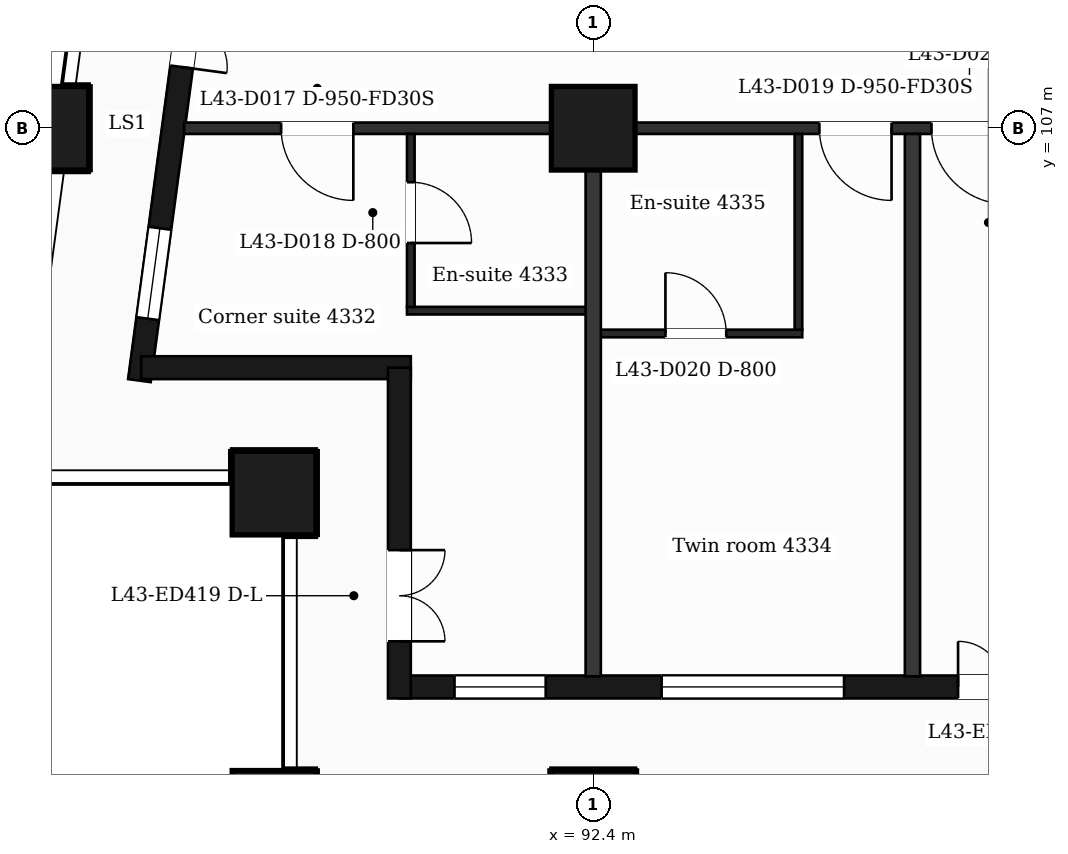
"""IFC4 building model, lengths in metres.
Left out: names, types, materials, properties, quantities, classifications, styles, units other than length and angle.
Written with IfcOpenShell. Run it as: python <this file> out.ifc"""

import sys

from ifc_helpers import new_model, si_unit, direction, frame, frame_2d, origin, origin_2d, place, context, subcontext, project, spatial, rectangle, extrude, element, fill, save


model = new_model("IFC4")
c1 = context("Model", 3, precision=1e-05, world=origin(), true_north=direction((0.0, 1.0)))
c2 = subcontext(c1, "Body", "Model", "MODEL_VIEW")
j1 = project(units=[si_unit("LENGTHUNIT", "METRE"), si_unit("PLANEANGLEUNIT", "RADIAN")], contexts=[c1])
p1 = place(None, origin())
s1 = spatial("IfcSite", under=j1, at=p1, CompositionType="ELEMENT")
p2 = place(p1, origin())
s2 = spatial("IfcBuilding", under=s1, at=p2, CompositionType="ELEMENT")
p3 = place(p2, frame((0.0, 0.0, 181.1)))
s3 = spatial("IfcBuildingStorey", under=s2, at=p3, CompositionType="ELEMENT", Elevation=181.1)
for number, where, z_axis, x_axis in (
    (1, (92.4, 98.0, 0.0), (0.0, 0.0, 1.0), (1.0, 0.0, 0.0)),
    (2, (88.2, 98.0, 0.0), (0.0, 0.0, 1.0), (1.0, 0.0, 0.0)),
    (3, (88.2, 102.2, 0.0), (0.0, 0.0, 1.0), (1.0, 0.0, 0.0)),
    (4, (92.4, 107.0, 0.0), (0.0, 0.0, 1.0), (1.0, 0.0, 0.0)),
    (5, (85.211, 107.0, 0.0), (0.0, 0.0, 1.0), (1.0, 0.0, 0.0)),
):
    element("IfcColumn", number, at=place(p3, frame(where, z_axis=z_axis, x_axis=x_axis)), inside=s3, PredefinedType="COLUMN", context=c2, shape_type="SweptSolid", body=[
        extrude(rectangle(XDim=1.1, YDim=1.1, at=origin_2d()), origin(), (0.0, 0.0, 1.0), 3.7),
    ])
p4 = place(p3, frame((89.85, 99.65, 0.0), z_axis=(0.0, 0.0, 1.0), x_axis=(1.0, 0.0, 0.0)))
e6 = element("IfcWall", 6, at=p4, inside=s3, PredefinedType="SOLIDWALL", context=c2, shape_type="SweptSolid", body=[
    extrude(rectangle(XDim=47.25, YDim=0.3, at=frame_2d((23.625, 0.0))), origin(), (0.0, 0.0, 1.0), 3.38),
])
p5 = place(p4, frame((0.725, 0.0, 0.9)))
e7 = element("IfcOpeningElement", 7, at=p5, cuts=e6, PredefinedType="OPENING", context=c2, shape_type="SweptSolid", body=[
    extrude(rectangle(XDim=1.2, YDim=2.1, at=frame_2d((0.6, 1.05))), frame((0.0, 0.16, 0.0), z_axis=(0.0, -1.0, 0.0), x_axis=(1.0, 0.0, 0.0)), (0.0, 0.0, 1.0), 0.32),
])
p6 = place(p4, frame((3.45, 0.0, 0.9)))
e8 = element("IfcOpeningElement", 8, at=p6, cuts=e6, PredefinedType="OPENING", context=c2, shape_type="SweptSolid", body=[
    extrude(rectangle(XDim=2.4, YDim=2.1, at=frame_2d((1.2, 1.05))), frame((0.0, 0.16, 0.0), z_axis=(0.0, -1.0, 0.0), x_axis=(1.0, 0.0, 0.0)), (0.0, 0.0, 1.0), 0.32),
])
p7 = place(p4, frame((7.35, 0.0, 0.0)))
e9 = element("IfcOpeningElement", 9, at=p7, cuts=e6, PredefinedType="OPENING", context=c2, shape_type="SweptSolid", body=[
    extrude(rectangle(XDim=1.2, YDim=2.4, at=frame_2d((0.6, 1.2))), frame((0.0, 0.16, 0.0), z_axis=(0.0, -1.0, 0.0), x_axis=(1.0, 0.0, 0.0)), (0.0, 0.0, 1.0), 0.32),
])
p8 = place(p4, frame((9.15, 0.0, 0.9)))
e10 = element("IfcOpeningElement", 10, at=p8, cuts=e6, PredefinedType="OPENING", context=c2, shape_type="SweptSolid", body=[
    extrude(rectangle(XDim=1.2, YDim=2.1, at=frame_2d((0.6, 1.05))), frame((0.0, 0.16, 0.0), z_axis=(0.0, -1.0, 0.0), x_axis=(1.0, 0.0, 0.0)), (0.0, 0.0, 1.0), 0.32),
])
p9 = place(p4, frame((11.85, 0.0, 0.9)))
e11 = element("IfcOpeningElement", 11, at=p9, cuts=e6, PredefinedType="OPENING", context=c2, shape_type="SweptSolid", body=[
    extrude(rectangle(XDim=2.4, YDim=2.1, at=frame_2d((1.2, 1.05))), frame((0.0, 0.16, 0.0), z_axis=(0.0, -1.0, 0.0), x_axis=(1.0, 0.0, 0.0)), (0.0, 0.0, 1.0), 0.32),
])
p10 = place(p4, frame((16.05, 0.0, 0.9)))
e12 = element("IfcOpeningElement", 12, at=p10, cuts=e6, PredefinedType="OPENING", context=c2, shape_type="SweptSolid", body=[
    extrude(rectangle(XDim=2.4, YDim=2.1, at=frame_2d((1.2, 1.05))), frame((0.0, 0.16, 0.0), z_axis=(0.0, -1.0, 0.0), x_axis=(1.0, 0.0, 0.0)), (0.0, 0.0, 1.0), 0.32),
])
p11 = place(p4, frame((20.85, 0.0, 0.9)))
e13 = element("IfcOpeningElement", 13, at=p11, cuts=e6, PredefinedType="OPENING", context=c2, shape_type="SweptSolid", body=[
    extrude(rectangle(XDim=1.2, YDim=2.1, at=frame_2d((0.6, 1.05))), frame((0.0, 0.16, 0.0), z_axis=(0.0, -1.0, 0.0), x_axis=(1.0, 0.0, 0.0)), (0.0, 0.0, 1.0), 0.32),
])
p12 = place(p4, frame((25.05, 0.0, 0.9)))
e14 = element("IfcOpeningElement", 14, at=p12, cuts=e6, PredefinedType="OPENING", context=c2, shape_type="SweptSolid", body=[
    extrude(rectangle(XDim=1.2, YDim=2.1, at=frame_2d((0.6, 1.05))), frame((0.0, 0.16, 0.0), z_axis=(0.0, -1.0, 0.0), x_axis=(1.0, 0.0, 0.0)), (0.0, 0.0, 1.0), 0.32),
])
p13 = place(p4, frame((28.65, 0.0, 0.9)))
e15 = element("IfcOpeningElement", 15, at=p13, cuts=e6, PredefinedType="OPENING", context=c2, shape_type="SweptSolid", body=[
    extrude(rectangle(XDim=2.4, YDim=2.1, at=frame_2d((1.2, 1.05))), frame((0.0, 0.16, 0.0), z_axis=(0.0, -1.0, 0.0), x_axis=(1.0, 0.0, 0.0)), (0.0, 0.0, 1.0), 0.32),
])
p14 = place(p4, frame((32.85, 0.0, 0.9)))
e16 = element("IfcOpeningElement", 16, at=p14, cuts=e6, PredefinedType="OPENING", context=c2, shape_type="SweptSolid", body=[
    extrude(rectangle(XDim=2.4, YDim=2.1, at=frame_2d((1.2, 1.05))), frame((0.0, 0.16, 0.0), z_axis=(0.0, -1.0, 0.0), x_axis=(1.0, 0.0, 0.0)), (0.0, 0.0, 1.0), 0.32),
])
p15 = place(p4, frame((37.05, 0.0, 0.9)))
e17 = element("IfcOpeningElement", 17, at=p15, cuts=e6, PredefinedType="OPENING", context=c2, shape_type="SweptSolid", body=[
    extrude(rectangle(XDim=2.4, YDim=2.1, at=frame_2d((1.2, 1.05))), frame((0.0, 0.16, 0.0), z_axis=(0.0, -1.0, 0.0), x_axis=(1.0, 0.0, 0.0)), (0.0, 0.0, 1.0), 0.32),
])
p16 = place(p4, frame((41.25, 0.0, 0.9)))
e18 = element("IfcOpeningElement", 18, at=p16, cuts=e6, PredefinedType="OPENING", context=c2, shape_type="SweptSolid", body=[
    extrude(rectangle(XDim=2.4, YDim=2.1, at=frame_2d((1.2, 1.05))), frame((0.0, 0.16, 0.0), z_axis=(0.0, -1.0, 0.0), x_axis=(1.0, 0.0, 0.0)), (0.0, 0.0, 1.0), 0.32),
])
p17 = place(p4, frame((45.25, 0.0, 0.9)))
e19 = element("IfcOpeningElement", 19, at=p17, cuts=e6, PredefinedType="OPENING", context=c2, shape_type="SweptSolid", body=[
    extrude(rectangle(XDim=1.2, YDim=2.1, at=frame_2d((0.6, 1.05))), frame((0.0, 0.16, 0.0), z_axis=(0.0, -1.0, 0.0), x_axis=(1.0, 0.0, 0.0)), (0.0, 0.0, 1.0), 0.32),
])
p18 = place(p3, frame((87.334, 110.4, 0.0), z_axis=(0.0, 0.0, 1.0), x_axis=(-0.133437175554, -0.991057273915, 0.0)))
e20 = element("IfcWall", 20, at=p18, inside=s3, PredefinedType="SOLIDWALL", context=c2, shape_type="SweptSolid", body=[
    extrude(rectangle(XDim=6.781, YDim=0.3, at=frame_2d((3.39, 0.0))), origin(), (0.0, 0.0, 1.0), 3.38),
])
p19 = place(p18, frame((1.418, 0.0, 0.0)))
e21 = element("IfcOpeningElement", 21, at=p19, cuts=e20, PredefinedType="OPENING", context=c2, shape_type="SweptSolid", body=[
    extrude(rectangle(XDim=1.2, YDim=2.4, at=frame_2d((0.6, 1.2))), frame((0.0, 0.16, 0.0), z_axis=(0.0, -1.0, 0.0), x_axis=(1.0, 0.0, 0.0)), (0.0, 0.0, 1.0), 0.32),
])
p20 = place(p18, frame((4.758, 0.0, 0.9)))
e22 = element("IfcOpeningElement", 22, at=p20, cuts=e20, PredefinedType="OPENING", context=c2, shape_type="SweptSolid", body=[
    extrude(rectangle(XDim=1.2, YDim=2.1, at=frame_2d((0.6, 1.05))), frame((0.0, 0.16, 0.0), z_axis=(0.0, -1.0, 0.0), x_axis=(1.0, 0.0, 0.0)), (0.0, 0.0, 1.0), 0.32),
])
p21 = place(p3, frame((86.452, 103.85, 0.0), z_axis=(0.0, 0.0, 1.0), x_axis=(1.0, 0.0, 0.0)))
e23 = element("IfcWall", 23, at=p21, inside=s3, PredefinedType="SOLIDWALL", context=c2, shape_type="SweptSolid", body=[
    extrude(rectangle(XDim=3.548, YDim=0.3, at=frame_2d((1.774, 0.0))), origin(), (0.0, 0.0, 1.0), 3.38),
])
p22 = place(p3, frame((89.85, 103.85, 0.0), z_axis=(0.0, 0.0, 1.0), x_axis=(0.0, -1.0, 0.0)))
e24 = element("IfcWall", 24, at=p22, inside=s3, PredefinedType="SOLIDWALL", context=c2, shape_type="SweptSolid", body=[
    extrude(rectangle(XDim=4.35, YDim=0.3, at=frame_2d((2.175, 0.0))), origin(), (0.0, 0.0, 1.0), 3.38),
])
p23 = place(p22, frame((2.4, 0.0, 0.0)))
e25 = element("IfcOpeningElement", 25, at=p23, cuts=e24, PredefinedType="OPENING", context=c2, shape_type="SweptSolid", body=[
    extrude(rectangle(XDim=1.2, YDim=2.4, at=frame_2d((0.6, 1.2))), frame((0.0, 0.16, 0.0), z_axis=(0.0, -1.0, 0.0), x_axis=(1.0, 0.0, 0.0)), (0.0, 0.0, 1.0), 0.32),
])
p24 = place(p3, frame((92.4, 104.3, 0.0), z_axis=(0.0, 0.0, 1.0), x_axis=(1.0, 0.0, 0.0)))
e26 = element("IfcWall", 26, at=p24, inside=s3, PredefinedType="PARTITIONING", context=c2, shape_type="SweptSolid", body=[
    extrude(rectangle(XDim=2.75, YDim=0.1, at=frame_2d((1.375, 0.0))), origin(), (0.0, 0.0, 1.0), 3.38),
])
p25 = place(p24, frame((0.95, 0.0, 0.0)))
e27 = element("IfcOpeningElement", 27, at=p25, cuts=e26, PredefinedType="OPENING", context=c2, shape_type="SweptSolid", body=[
    extrude(rectangle(XDim=0.8, YDim=2.1, at=frame_2d((0.4, 1.05))), frame((0.0, 0.06, 0.0), z_axis=(0.0, -1.0, 0.0), x_axis=(1.0, 0.0, 0.0)), (0.0, 0.0, 1.0), 0.12),
])
p26 = place(p3, frame((89.95, 104.6, 0.0), z_axis=(0.0, 0.0, 1.0), x_axis=(1.0, 0.0, 0.0)))
e28 = element("IfcWall", 28, at=p26, inside=s3, PredefinedType="PARTITIONING", context=c2, shape_type="SweptSolid", body=[
    extrude(rectangle(XDim=2.45, YDim=0.1, at=frame_2d((1.225, 0.0))), origin(), (0.0, 0.0, 1.0), 3.38),
])
p27 = place(p3, frame((87.018, 107.0, 0.0), z_axis=(0.0, 0.0, 1.0), x_axis=(1.0, 0.0, 0.0)))
e29 = element("IfcWall", 29, at=p27, inside=s3, PredefinedType="PARTITIONING", context=c2, shape_type="SweptSolid", body=[
    extrude(rectangle(XDim=52.765, YDim=0.15, at=frame_2d((26.382, 0.0))), origin(), (0.0, 0.0, 1.0), 3.38),
])
p28 = place(p27, frame((1.276, 0.0, 0.0)))
e30 = element("IfcOpeningElement", 30, at=p28, cuts=e29, PredefinedType="OPENING", context=c2, shape_type="SweptSolid", body=[
    extrude(rectangle(XDim=0.95, YDim=2.1, at=frame_2d((0.475, 1.05))), frame((0.0, 0.085, 0.0), z_axis=(0.0, -1.0, 0.0), x_axis=(1.0, 0.0, 0.0)), (0.0, 0.0, 1.0), 0.17),
])
p29 = place(p27, frame((8.357, 0.0, 0.0)))
e31 = element("IfcOpeningElement", 31, at=p29, cuts=e29, PredefinedType="OPENING", context=c2, shape_type="SweptSolid", body=[
    extrude(rectangle(XDim=0.95, YDim=2.1, at=frame_2d((0.475, 1.05))), frame((0.0, 0.085, 0.0), z_axis=(0.0, -1.0, 0.0), x_axis=(1.0, 0.0, 0.0)), (0.0, 0.0, 1.0), 0.17),
])
p30 = place(p27, frame((9.832, 0.0, 0.0)))
e32 = element("IfcOpeningElement", 32, at=p30, cuts=e29, PredefinedType="OPENING", context=c2, shape_type="SweptSolid", body=[
    extrude(rectangle(XDim=1.0, YDim=2.1, at=frame_2d((0.5, 1.05))), frame((0.0, 0.085, 0.0), z_axis=(0.0, -1.0, 0.0), x_axis=(1.0, 0.0, 0.0)), (0.0, 0.0, 1.0), 0.17),
])
p31 = place(p27, frame((14.547, 0.0, 0.0)))
e33 = element("IfcOpeningElement", 33, at=p31, cuts=e29, PredefinedType="OPENING", context=c2, shape_type="SweptSolid", body=[
    extrude(rectangle(XDim=0.95, YDim=2.1, at=frame_2d((0.475, 1.05))), frame((0.0, 0.085, 0.0), z_axis=(0.0, -1.0, 0.0), x_axis=(1.0, 0.0, 0.0)), (0.0, 0.0, 1.0), 0.17),
])
p32 = place(p27, frame((18.257, 0.0, 0.0)))
e34 = element("IfcOpeningElement", 34, at=p32, cuts=e29, PredefinedType="OPENING", context=c2, shape_type="SweptSolid", body=[
    extrude(rectangle(XDim=0.95, YDim=2.1, at=frame_2d((0.475, 1.05))), frame((0.0, 0.085, 0.0), z_axis=(0.0, -1.0, 0.0), x_axis=(1.0, 0.0, 0.0)), (0.0, 0.0, 1.0), 0.17),
])
p33 = place(p27, frame((25.212, 0.0, 0.0)))
e35 = element("IfcOpeningElement", 35, at=p33, cuts=e29, PredefinedType="OPENING", context=c2, shape_type="SweptSolid", body=[
    extrude(rectangle(XDim=1.0, YDim=2.1, at=frame_2d((0.5, 1.05))), frame((0.0, 0.085, 0.0), z_axis=(0.0, -1.0, 0.0), x_axis=(1.0, 0.0, 0.0)), (0.0, 0.0, 1.0), 0.17),
])
p34 = place(p27, frame((37.267, 0.0, 0.0)))
e36 = element("IfcOpeningElement", 36, at=p34, cuts=e29, PredefinedType="OPENING", context=c2, shape_type="SweptSolid", body=[
    extrude(rectangle(XDim=0.95, YDim=2.1, at=frame_2d((0.475, 1.05))), frame((0.0, 0.085, 0.0), z_axis=(0.0, -1.0, 0.0), x_axis=(1.0, 0.0, 0.0)), (0.0, 0.0, 1.0), 0.17),
])
p35 = place(p27, frame((41.957, 0.0, 0.0)))
e37 = element("IfcOpeningElement", 37, at=p35, cuts=e29, PredefinedType="OPENING", context=c2, shape_type="SweptSolid", body=[
    extrude(rectangle(XDim=0.95, YDim=2.1, at=frame_2d((0.475, 1.05))), frame((0.0, 0.085, 0.0), z_axis=(0.0, -1.0, 0.0), x_axis=(1.0, 0.0, 0.0)), (0.0, 0.0, 1.0), 0.17),
])
p36 = place(p27, frame((45.632, 0.0, 0.0)))
e38 = element("IfcOpeningElement", 38, at=p36, cuts=e29, PredefinedType="OPENING", context=c2, shape_type="SweptSolid", body=[
    extrude(rectangle(XDim=0.95, YDim=2.1, at=frame_2d((0.475, 1.05))), frame((0.0, 0.085, 0.0), z_axis=(0.0, -1.0, 0.0), x_axis=(1.0, 0.0, 0.0)), (0.0, 0.0, 1.0), 0.17),
])
p37 = place(p27, frame((48.767, 0.0, 0.0)))
e39 = element("IfcOpeningElement", 39, at=p37, cuts=e29, PredefinedType="OPENING", context=c2, shape_type="SweptSolid", body=[
    extrude(rectangle(XDim=0.95, YDim=2.1, at=frame_2d((0.475, 1.05))), frame((0.0, 0.085, 0.0), z_axis=(0.0, -1.0, 0.0), x_axis=(1.0, 0.0, 0.0)), (0.0, 0.0, 1.0), 0.17),
])
p38 = place(p3, frame((90.0, 104.65, 0.0), z_axis=(0.0, 0.0, 1.0), x_axis=(0.0, 1.0, 0.0)))
e40 = element("IfcWall", 40, at=p38, inside=s3, PredefinedType="PARTITIONING", context=c2, shape_type="SweptSolid", body=[
    extrude(rectangle(XDim=2.275, YDim=0.1, at=frame_2d((1.138, 0.0))), origin(), (0.0, 0.0, 1.0), 3.38),
])
p39 = place(p38, frame((0.84, 0.0, 0.0)))
e41 = element("IfcOpeningElement", 41, at=p39, cuts=e40, PredefinedType="OPENING", context=c2, shape_type="SweptSolid", body=[
    extrude(rectangle(XDim=0.8, YDim=2.1, at=frame_2d((0.4, 1.05))), frame((0.0, 0.06, 0.0), z_axis=(0.0, -1.0, 0.0), x_axis=(1.0, 0.0, 0.0)), (0.0, 0.0, 1.0), 0.12),
])
p40 = place(p3, frame((92.4, 99.79, 0.0), z_axis=(0.0, 0.0, 1.0), x_axis=(0.0, 1.0, 0.0)))
e42 = element("IfcWall", 42, at=p40, inside=s3, PredefinedType="PARTITIONING", context=c2, shape_type="SweptSolid", body=[
    extrude(rectangle(XDim=7.135, YDim=0.2, at=frame_2d((3.567, 0.0))), origin(), (0.0, 0.0, 1.0), 3.38),
])
p41 = place(p3, frame((95.1, 104.35, 0.0), z_axis=(0.0, 0.0, 1.0), x_axis=(0.0, 1.0, 0.0)))
e43 = element("IfcWall", 43, at=p41, inside=s3, PredefinedType="PARTITIONING", context=c2, shape_type="SweptSolid", body=[
    extrude(rectangle(XDim=2.575, YDim=0.1, at=frame_2d((1.288, 0.0))), origin(), (0.0, 0.0, 1.0), 3.38),
])
p42 = place(p3, frame((96.6, 99.79, 0.0), z_axis=(0.0, 0.0, 1.0), x_axis=(0.0, 1.0, 0.0)))
e44 = element("IfcWall", 44, at=p42, inside=s3, PredefinedType="PARTITIONING", context=c2, shape_type="SweptSolid", body=[
    extrude(rectangle(XDim=7.135, YDim=0.2, at=frame_2d((3.567, 0.0))), origin(), (0.0, 0.0, 1.0), 3.38),
])
p43 = place(p5, origin())
e45 = element("IfcWindow", 45, at=p43, inside=s3, PartitioningType="SINGLE_PANEL", PredefinedType="WINDOW", context=c2, shape_type="SweptSolid", body=[
    extrude(rectangle(XDim=1.2, YDim=2.1, at=frame_2d((0.6, 1.05))), frame((0.0, 0.03, 0.0), z_axis=(0.0, -1.0, 0.0), x_axis=(1.0, 0.0, 0.0)), (0.0, 0.0, 1.0), 0.06),
])
fill(e7, e45)
p44 = place(p6, origin())
e46 = element("IfcWindow", 46, at=p44, inside=s3, PartitioningType="SINGLE_PANEL", PredefinedType="WINDOW", context=c2, shape_type="SweptSolid", body=[
    extrude(rectangle(XDim=2.4, YDim=2.1, at=frame_2d((1.2, 1.05))), frame((0.0, 0.03, 0.0), z_axis=(0.0, -1.0, 0.0), x_axis=(1.0, 0.0, 0.0)), (0.0, 0.0, 1.0), 0.06),
])
fill(e8, e46)
p45 = place(p7, origin())
e47 = element("IfcDoor", 47, at=p45, inside=s3, OperationType="DOUBLE_DOOR_SINGLE_SWING", PredefinedType="DOOR", context=c2, shape_type="SweptSolid", body=[
    extrude(rectangle(XDim=1.2, YDim=2.4, at=frame_2d((0.6, 1.2))), frame((0.0, 0.025, 0.0), z_axis=(0.0, -1.0, 0.0), x_axis=(1.0, 0.0, 0.0)), (0.0, 0.0, 1.0), 0.05),
])
fill(e9, e47)
p46 = place(p19, origin())
e48 = element("IfcDoor", 48, at=p46, inside=s3, OperationType="DOUBLE_DOOR_SINGLE_SWING", PredefinedType="DOOR", context=c2, shape_type="SweptSolid", body=[
    extrude(rectangle(XDim=1.2, YDim=2.4, at=frame_2d((0.6, 1.2))), frame((0.0, 0.025, 0.0), z_axis=(0.0, -1.0, 0.0), x_axis=(1.0, 0.0, 0.0)), (0.0, 0.0, 1.0), 0.05),
])
fill(e21, e48)
p47 = place(p20, origin())
e49 = element("IfcWindow", 49, at=p47, inside=s3, PartitioningType="SINGLE_PANEL", PredefinedType="WINDOW", context=c2, shape_type="SweptSolid", body=[
    extrude(rectangle(XDim=1.2, YDim=2.1, at=frame_2d((0.6, 1.05))), frame((0.0, 0.03, 0.0), z_axis=(0.0, -1.0, 0.0), x_axis=(1.0, 0.0, 0.0)), (0.0, 0.0, 1.0), 0.06),
])
fill(e22, e49)
p48 = place(p23, origin())
e50 = element("IfcDoor", 50, at=p48, inside=s3, OperationType="DOUBLE_DOOR_SINGLE_SWING", PredefinedType="DOOR", context=c2, shape_type="SweptSolid", body=[
    extrude(rectangle(XDim=1.2, YDim=2.4, at=frame_2d((0.6, 1.2))), frame((0.0, 0.025, 0.0), z_axis=(0.0, -1.0, 0.0), x_axis=(1.0, 0.0, 0.0)), (0.0, 0.0, 1.0), 0.05),
])
fill(e25, e50)
p49 = place(p28, origin())
e51 = element("IfcDoor", 51, at=p49, inside=s3, OperationType="SINGLE_SWING_RIGHT", PredefinedType="DOOR", context=c2, shape_type="SweptSolid", body=[
    extrude(rectangle(XDim=0.95, YDim=2.1, at=frame_2d((0.475, 1.05))), frame((0.0, 0.025, 0.0), z_axis=(0.0, -1.0, 0.0), x_axis=(1.0, 0.0, 0.0)), (0.0, 0.0, 1.0), 0.05),
])
fill(e30, e51)
p50 = place(p39, origin())
e52 = element("IfcDoor", 52, at=p50, inside=s3, OperationType="SINGLE_SWING_LEFT", PredefinedType="DOOR", context=c2, shape_type="SweptSolid", body=[
    extrude(rectangle(XDim=0.8, YDim=2.1, at=frame_2d((0.4, 1.05))), frame((0.0, 0.025, 0.0), z_axis=(0.0, -1.0, 0.0), x_axis=(1.0, 0.0, 0.0)), (0.0, 0.0, 1.0), 0.05),
])
fill(e41, e52)
p51 = place(p29, origin())
e53 = element("IfcDoor", 53, at=p51, inside=s3, OperationType="SINGLE_SWING_RIGHT", PredefinedType="DOOR", context=c2, shape_type="SweptSolid", body=[
    extrude(rectangle(XDim=0.95, YDim=2.1, at=frame_2d((0.475, 1.05))), frame((0.0, 0.025, 0.0), z_axis=(0.0, -1.0, 0.0), x_axis=(1.0, 0.0, 0.0)), (0.0, 0.0, 1.0), 0.05),
])
fill(e31, e53)
p52 = place(p25, origin())
e54 = element("IfcDoor", 54, at=p52, inside=s3, OperationType="SINGLE_SWING_LEFT", PredefinedType="DOOR", context=c2, shape_type="SweptSolid", body=[
    extrude(rectangle(XDim=0.8, YDim=2.1, at=frame_2d((0.4, 1.05))), frame((0.0, 0.025, 0.0), z_axis=(0.0, -1.0, 0.0), x_axis=(1.0, 0.0, 0.0)), (0.0, 0.0, 1.0), 0.05),
])
fill(e27, e54)
p53 = place(p30, origin())
e55 = element("IfcDoor", 55, at=p53, inside=s3, OperationType="SINGLE_SWING_RIGHT", PredefinedType="DOOR", context=c2, shape_type="SweptSolid", body=[
    extrude(rectangle(XDim=1.0, YDim=2.1, at=frame_2d((0.5, 1.05))), frame((0.0, 0.025, 0.0), z_axis=(0.0, -1.0, 0.0), x_axis=(1.0, 0.0, 0.0)), (0.0, 0.0, 1.0), 0.05),
])
fill(e32, e55)
save(model, sys.argv[1])
